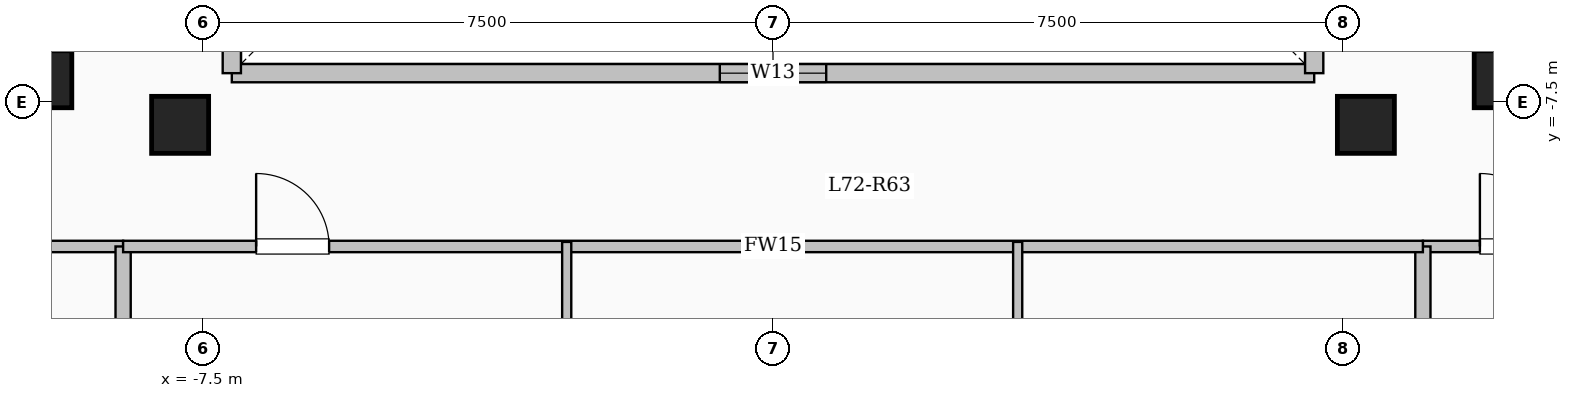
"""IFC4 building model, lengths in metres.
Left out: names, types, materials, properties, quantities, classifications, styles, units other than length and angle.
Written with IfcOpenShell. Run it as: python <this file> out.ifc"""

import sys

from ifc_helpers import new_model, si_unit, direction, frame, frame_2d, origin, origin_2d, place, context, subcontext, project, spatial, rectangle, extrude, element, fill, save


model = new_model("IFC4")
c1 = context("Model", 3, precision=1e-05, world=origin(), true_north=direction((0.0, 1.0)))
c2 = subcontext(c1, "Body", "Model", "MODEL_VIEW")
j1 = project(units=[si_unit("LENGTHUNIT", "METRE"), si_unit("PLANEANGLEUNIT", "RADIAN")], contexts=[c1])
p1 = place(None, origin())
s1 = spatial("IfcSite", under=j1, at=p1, CompositionType="ELEMENT")
p2 = place(p1, origin())
s2 = spatial("IfcBuilding", under=s1, at=p2, CompositionType="ELEMENT")
p3 = place(p2, frame((0.0, 0.0, 264.95)))
s3 = spatial("IfcBuildingStorey", under=s2, at=p3, CompositionType="ELEMENT", Elevation=264.95)
for number, where, z_axis, x_axis in (
    (1, (-7.8, -7.8, 0.0), (0.0, 0.0, 1.0), (1.0, 0.0, 0.0)),
    (2, (7.8, -7.8, 0.0), (0.0, 0.0, 1.0), (1.0, 0.0, 0.0)),
    (3, (-9.6, -7.2, 0.0), (0.0, 0.0, 1.0), (1.0, 0.0, 0.0)),
    (4, (9.6, -7.2, 0.0), (0.0, 0.0, 1.0), (1.0, 0.0, 0.0)),
):
    element("IfcColumn", number, at=place(p3, frame(where, z_axis=z_axis, x_axis=x_axis)), inside=s3, PredefinedType="COLUMN", context=c2, shape_type="SweptSolid", body=[
        extrude(rectangle(XDim=0.75, YDim=0.75, at=origin_2d()), origin(), (0.0, 0.0, 1.0), 3.35),
    ])
p4 = place(p3, frame((-7.12, -7.12, 0.0), z_axis=(0.0, 0.0, 1.0), x_axis=(1.0, 0.0, 0.0)))
e5 = element("IfcWall", 5, at=p4, inside=s3, PredefinedType="SOLIDWALL", context=c2, shape_type="SweptSolid", body=[
    extrude(rectangle(XDim=14.24, YDim=0.24, at=frame_2d((7.12, 0.0))), origin(), (0.0, 0.0, 1.0), 3.1),
])
p5 = place(p4, frame((6.42, 0.0, 0.95)))
e6 = element("IfcOpeningElement", 6, at=p5, cuts=e5, PredefinedType="OPENING", context=c2, shape_type="SweptSolid", body=[
    extrude(rectangle(XDim=1.4, YDim=1.5, at=frame_2d((0.7, 0.75))), frame((0.0, 0.13, 0.0), z_axis=(0.0, -1.0, 0.0), x_axis=(1.0, 0.0, 0.0)), (0.0, 0.0, 1.0), 0.26),
])
p6 = place(p3, frame((7.12, -7.12, 0.0), z_axis=(0.0, 0.0, 1.0), x_axis=(0.0, 1.0, 0.0)))
e7 = element("IfcWall", 7, at=p6, inside=s3, PredefinedType="SOLIDWALL", context=c2, shape_type="SweptSolid", body=[
    extrude(rectangle(XDim=14.24, YDim=0.24, at=frame_2d((7.12, 0.0))), origin(), (0.0, 0.0, 1.0), 3.1),
])
p7 = place(p6, frame((6.42, 0.0, 0.95)))
e8 = element("IfcOpeningElement", 8, at=p7, cuts=e7, PredefinedType="OPENING", context=c2, shape_type="SweptSolid", body=[
    extrude(rectangle(XDim=1.4, YDim=1.5, at=frame_2d((0.7, 0.75))), frame((0.0, 0.13, 0.0), z_axis=(0.0, -1.0, 0.0), x_axis=(1.0, 0.0, 0.0)), (0.0, 0.0, 1.0), 0.26),
])
p8 = place(p3, frame((-7.12, 7.12, 0.0), z_axis=(0.0, 0.0, 1.0), x_axis=(0.0, -1.0, 0.0)))
e9 = element("IfcWall", 9, at=p8, inside=s3, PredefinedType="SOLIDWALL", context=c2, shape_type="SweptSolid", body=[
    extrude(rectangle(XDim=14.24, YDim=0.24, at=frame_2d((7.12, 0.0))), origin(), (0.0, 0.0, 1.0), 3.1),
])
p9 = place(p8, frame((6.42, 0.0, 0.95)))
e10 = element("IfcOpeningElement", 10, at=p9, cuts=e9, PredefinedType="OPENING", context=c2, shape_type="SweptSolid", body=[
    extrude(rectangle(XDim=1.4, YDim=1.5, at=frame_2d((0.7, 0.75))), frame((0.0, 0.13, 0.0), z_axis=(0.0, -1.0, 0.0), x_axis=(1.0, 0.0, 0.0)), (0.0, 0.0, 1.0), 0.26),
])
p10 = place(p3, frame((-17.75, -9.4, 0.0), z_axis=(0.0, 0.0, 1.0), x_axis=(1.0, 0.0, 0.0)))
e11 = element("IfcWall", 11, at=p10, inside=s3, PredefinedType="PARTITIONING", context=c2, shape_type="SweptSolid", body=[
    extrude(rectangle(XDim=9.2, YDim=0.15, at=frame_2d((4.6, 0.0))), origin(), (0.0, 0.0, 1.0), 3.1),
])
p11 = place(p10, frame((0.7, 0.0, 0.0)))
e12 = element("IfcOpeningElement", 12, at=p11, cuts=e11, PredefinedType="OPENING", context=c2, shape_type="SweptSolid", body=[
    extrude(rectangle(XDim=0.96, YDim=2.15, at=frame_2d((0.48, 1.075))), frame((0.0, 0.085, 0.0), z_axis=(0.0, -1.0, 0.0), x_axis=(1.0, 0.0, 0.0)), (0.0, 0.0, 1.0), 0.17),
])
p12 = place(p10, frame((5.275, 0.0, 0.0)))
e13 = element("IfcOpeningElement", 13, at=p12, cuts=e11, PredefinedType="OPENING", context=c2, shape_type="SweptSolid", body=[
    extrude(rectangle(XDim=0.96, YDim=2.15, at=frame_2d((0.48, 1.075))), frame((0.0, 0.085, 0.0), z_axis=(0.0, -1.0, 0.0), x_axis=(1.0, 0.0, 0.0)), (0.0, 0.0, 1.0), 0.17),
])
p13 = place(p3, frame((8.55, -9.4, 0.0), z_axis=(0.0, 0.0, 1.0), x_axis=(1.0, 0.0, 0.0)))
e14 = element("IfcWall", 14, at=p13, inside=s3, PredefinedType="PARTITIONING", context=c2, shape_type="SweptSolid", body=[
    extrude(rectangle(XDim=9.2, YDim=0.15, at=frame_2d((4.6, 0.0))), origin(), (0.0, 0.0, 1.0), 3.1),
])
p14 = place(p13, frame((0.75, 0.0, 0.0)))
e15 = element("IfcOpeningElement", 15, at=p14, cuts=e14, PredefinedType="OPENING", context=c2, shape_type="SweptSolid", body=[
    extrude(rectangle(XDim=0.96, YDim=2.15, at=frame_2d((0.48, 1.075))), frame((0.0, 0.085, 0.0), z_axis=(0.0, -1.0, 0.0), x_axis=(1.0, 0.0, 0.0)), (0.0, 0.0, 1.0), 0.17),
])
p15 = place(p13, frame((5.142, 0.0, 0.0)))
e16 = element("IfcOpeningElement", 16, at=p15, cuts=e14, PredefinedType="OPENING", context=c2, shape_type="SweptSolid", body=[
    extrude(rectangle(XDim=0.96, YDim=2.15, at=frame_2d((0.48, 1.075))), frame((0.0, 0.085, 0.0), z_axis=(0.0, -1.0, 0.0), x_axis=(1.0, 0.0, 0.0)), (0.0, 0.0, 1.0), 0.17),
])
for number, where, z_axis, x_axis in (
    (17, (-8.55, -21.504, 0.0), (0.0, 0.0, 1.0), (0.0, 1.0, 0.0)),
    (18, (8.55, -21.504, 0.0), (0.0, 0.0, 1.0), (0.0, 1.0, 0.0)),
):
    element("IfcWall", number, at=place(p3, frame(where, z_axis=z_axis, x_axis=x_axis)), inside=s3, PredefinedType="SOLIDWALL", context=c2, shape_type="SweptSolid", body=[
        extrude(rectangle(XDim=12.104, YDim=0.2, at=frame_2d((6.052, 0.0))), origin(), (0.0, 0.0, 1.0), 3.1),
    ])
p16 = place(p3, frame((-8.55, -9.4, 0.0), z_axis=(0.0, 0.0, 1.0), x_axis=(1.0, 0.0, 0.0)))
e19 = element("IfcWall", 19, at=p16, inside=s3, PredefinedType="PARTITIONING", context=c2, shape_type="SweptSolid", body=[
    extrude(rectangle(XDim=17.1, YDim=0.15, at=frame_2d((8.55, 0.0))), origin(), (0.0, 0.0, 1.0), 3.1),
])
p17 = place(p16, frame((1.75, 0.0, 0.0)))
e20 = element("IfcOpeningElement", 20, at=p17, cuts=e19, PredefinedType="OPENING", context=c2, shape_type="SweptSolid", body=[
    extrude(rectangle(XDim=0.96, YDim=2.15, at=frame_2d((0.48, 1.075))), frame((0.0, 0.085, 0.0), z_axis=(0.0, -1.0, 0.0), x_axis=(1.0, 0.0, 0.0)), (0.0, 0.0, 1.0), 0.17),
])
p18 = place(p3, frame((-2.714, -22.38, 0.0), z_axis=(0.0, 0.0, 1.0), x_axis=(0.0, 1.0, 0.0)))
e21 = element("IfcWall", 21, at=p18, inside=s3, PredefinedType="PARTITIONING", context=c2, shape_type="SweptSolid", body=[
    extrude(rectangle(XDim=13.04, YDim=0.12, at=frame_2d((6.52, 0.0))), origin(), (0.0, 0.0, 1.0), 3.1),
])
p19 = place(p18, frame((8.875, 0.0, 0.0)))
e22 = element("IfcOpeningElement", 22, at=p19, cuts=e21, PredefinedType="OPENING", context=c2, shape_type="SweptSolid", body=[
    extrude(rectangle(XDim=1.08, YDim=2.15, at=frame_2d((0.54, 1.075))), frame((0.0, 0.07, 0.0), z_axis=(0.0, -1.0, 0.0), x_axis=(1.0, 0.0, 0.0)), (0.0, 0.0, 1.0), 0.14),
])
p20 = place(p3, frame((3.219, -12.14, 0.0), z_axis=(0.0, 0.0, 1.0), x_axis=(0.0, 1.0, 0.0)))
e23 = element("IfcWall", 23, at=p20, inside=s3, PredefinedType="PARTITIONING", context=c2, shape_type="SweptSolid", body=[
    extrude(rectangle(XDim=2.8, YDim=0.12, at=frame_2d((1.4, 0.0))), origin(), (0.0, 0.0, 1.0), 3.1),
])
p21 = place(p5, origin())
e24 = element("IfcWindow", 24, at=p21, inside=s3, PartitioningType="SINGLE_PANEL", PredefinedType="WINDOW", context=c2, shape_type="SweptSolid", body=[
    extrude(rectangle(XDim=1.4, YDim=1.5, at=frame_2d((0.7, 0.75))), frame((0.0, 0.03, 0.0), z_axis=(0.0, -1.0, 0.0), x_axis=(1.0, 0.0, 0.0)), (0.0, 0.0, 1.0), 0.06),
])
fill(e6, e24)
p22 = place(p14, origin())
e25 = element("IfcDoor", 25, at=p22, inside=s3, OperationType="SINGLE_SWING_LEFT", PredefinedType="DOOR", context=c2, shape_type="SweptSolid", body=[
    extrude(rectangle(XDim=0.96, YDim=2.15, at=frame_2d((0.48, 1.075))), frame((0.0, 0.025, 0.0), z_axis=(0.0, -1.0, 0.0), x_axis=(1.0, 0.0, 0.0)), (0.0, 0.0, 1.0), 0.05),
])
fill(e15, e25)
p23 = place(p17, origin())
e26 = element("IfcDoor", 26, at=p23, inside=s3, OperationType="SINGLE_SWING_LEFT", PredefinedType="DOOR", context=c2, shape_type="SweptSolid", body=[
    extrude(rectangle(XDim=0.96, YDim=2.15, at=frame_2d((0.48, 1.075))), frame((0.0, 0.025, 0.0), z_axis=(0.0, -1.0, 0.0), x_axis=(1.0, 0.0, 0.0)), (0.0, 0.0, 1.0), 0.05),
])
fill(e20, e26)
save(model, sys.argv[1])
